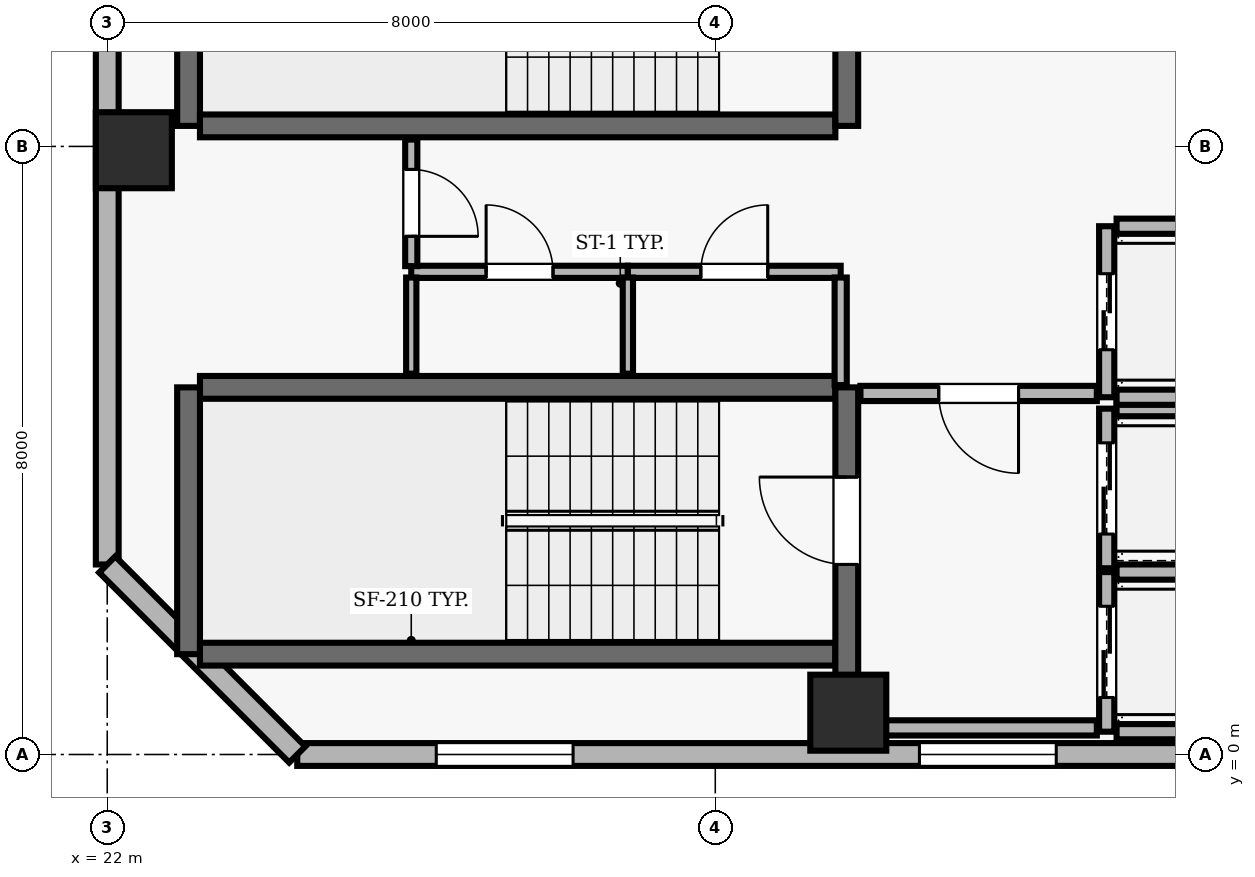
"""IFC4 building model, lengths in metres.
Left out: names, types, materials, properties, quantities, classifications, styles, units other than length and angle.
Written with IfcOpenShell. Run it as: python <this file> out.ifc"""

import sys

from ifc_helpers import new_model, si_unit, direction, frame, frame_2d, origin, origin_2d, place, context, subcontext, project, spatial, rectangle, extrude, element, fill, save


model = new_model("IFC4")
c1 = context("Model", 3, precision=1e-05, world=origin(), true_north=direction((0.0, 1.0)))
c2 = subcontext(c1, "Body", "Model", "MODEL_VIEW")
j1 = project(units=[si_unit("LENGTHUNIT", "METRE"), si_unit("PLANEANGLEUNIT", "RADIAN")], contexts=[c1])
p1 = place(None, origin())
s1 = spatial("IfcSite", under=j1, at=p1, CompositionType="ELEMENT")
p2 = place(p1, origin())
s2 = spatial("IfcBuilding", under=s1, at=p2, CompositionType="ELEMENT")
p3 = place(p2, frame((0.0, 0.0, 234.3)))
s3 = spatial("IfcBuildingStorey", under=s2, at=p3, CompositionType="ELEMENT", Elevation=234.3)
for number, where, z_axis, x_axis in (
    (1, (31.75, 0.55, 0.0), (0.0, 0.0, 1.0), (1.0, 0.0, 0.0)),
    (2, (22.35, 7.95, 0.0), (0.0, 0.0, 1.0), (1.0, 0.0, 0.0)),
):
    element("IfcColumn", number, at=place(p3, frame(where, z_axis=z_axis, x_axis=x_axis)), inside=s3, PredefinedType="COLUMN", context=c2, shape_type="SweptSolid", body=[
        extrude(rectangle(XDim=1.0, YDim=1.0, at=origin_2d()), origin(), (0.0, 0.0, 1.0), 3.9),
    ])
p4 = place(p3, frame((24.5, 0.0, 0.0), z_axis=(0.0, 0.0, 1.0), x_axis=(1.0, 0.0, 0.0)))
e3 = element("IfcWall", 3, at=p4, inside=s3, PredefinedType="SOLIDWALL", context=c2, shape_type="SweptSolid", body=[
    extrude(rectangle(XDim=38.2, YDim=0.3, at=frame_2d((19.1, 0.0))), origin(), (0.0, 0.0, 1.0), 3.64),
])
p5 = place(p4, frame((1.829, 0.0, 0.9)))
e4 = element("IfcOpeningElement", 4, at=p5, cuts=e3, PredefinedType="OPENING", context=c2, shape_type="SweptSolid", body=[
    extrude(rectangle(XDim=1.8, YDim=2.2, at=frame_2d((0.9, 1.1))), frame((0.0, 0.16, 0.0), z_axis=(0.0, -1.0, 0.0), x_axis=(1.0, 0.0, 0.0)), (0.0, 0.0, 1.0), 0.32),
])
p6 = place(p4, frame((8.186, 0.0, 0.9)))
e5 = element("IfcOpeningElement", 5, at=p6, cuts=e3, PredefinedType="OPENING", context=c2, shape_type="SweptSolid", body=[
    extrude(rectangle(XDim=1.8, YDim=2.2, at=frame_2d((0.9, 1.1))), frame((0.0, 0.16, 0.0), z_axis=(0.0, -1.0, 0.0), x_axis=(1.0, 0.0, 0.0)), (0.0, 0.0, 1.0), 0.32),
])
p7 = place(p4, frame((18.2, 0.0, 0.9)))
e6 = element("IfcOpeningElement", 6, at=p7, cuts=e3, PredefinedType="OPENING", context=c2, shape_type="SweptSolid", body=[
    extrude(rectangle(XDim=1.8, YDim=2.2, at=frame_2d((0.9, 1.1))), frame((0.0, 0.16, 0.0), z_axis=(0.0, -1.0, 0.0), x_axis=(1.0, 0.0, 0.0)), (0.0, 0.0, 1.0), 0.32),
])
p8 = place(p4, frame((23.657, 0.0, 0.9)))
e7 = element("IfcOpeningElement", 7, at=p8, cuts=e3, PredefinedType="OPENING", context=c2, shape_type="SweptSolid", body=[
    extrude(rectangle(XDim=1.8, YDim=2.2, at=frame_2d((0.9, 1.1))), frame((0.0, 0.16, 0.0), z_axis=(0.0, -1.0, 0.0), x_axis=(1.0, 0.0, 0.0)), (0.0, 0.0, 1.0), 0.32),
])
p9 = place(p4, frame((30.014, 0.0, 0.9)))
e8 = element("IfcOpeningElement", 8, at=p9, cuts=e3, PredefinedType="OPENING", context=c2, shape_type="SweptSolid", body=[
    extrude(rectangle(XDim=1.8, YDim=2.2, at=frame_2d((0.9, 1.1))), frame((0.0, 0.16, 0.0), z_axis=(0.0, -1.0, 0.0), x_axis=(1.0, 0.0, 0.0)), (0.0, 0.0, 1.0), 0.32),
])
p10 = place(p3, frame((22.0, 40.7, 0.0), z_axis=(0.0, 0.0, 1.0), x_axis=(0.0, -1.0, 0.0)))
e9 = element("IfcWall", 9, at=p10, inside=s3, PredefinedType="SOLIDWALL", context=c2, shape_type="SweptSolid", body=[
    extrude(rectangle(XDim=38.2, YDim=0.3, at=frame_2d((19.1, 0.0))), origin(), (0.0, 0.0, 1.0), 3.64),
])
p11 = place(p10, frame((6.7, 0.0, 0.0)))
e10 = element("IfcOpeningElement", 10, at=p11, cuts=e9, PredefinedType="OPENING", context=c2, shape_type="SweptSolid", body=[
    extrude(rectangle(XDim=1.0, YDim=2.2, at=frame_2d((0.5, 1.1))), frame((0.0, 0.16, 0.0), z_axis=(0.0, -1.0, 0.0), x_axis=(1.0, 0.0, 0.0)), (0.0, 0.0, 1.0), 0.32),
])
p12 = place(p10, frame((12.293, 0.0, 0.9)))
e11 = element("IfcOpeningElement", 11, at=p12, cuts=e9, PredefinedType="OPENING", context=c2, shape_type="SweptSolid", body=[
    extrude(rectangle(XDim=1.8, YDim=2.2, at=frame_2d((0.9, 1.1))), frame((0.0, 0.16, 0.0), z_axis=(0.0, -1.0, 0.0), x_axis=(1.0, 0.0, 0.0)), (0.0, 0.0, 1.0), 0.32),
])
p13 = place(p10, frame((18.2, 0.0, 0.9)))
e12 = element("IfcOpeningElement", 12, at=p13, cuts=e9, PredefinedType="OPENING", context=c2, shape_type="SweptSolid", body=[
    extrude(rectangle(XDim=1.8, YDim=2.2, at=frame_2d((0.9, 1.1))), frame((0.0, 0.16, 0.0), z_axis=(0.0, -1.0, 0.0), x_axis=(1.0, 0.0, 0.0)), (0.0, 0.0, 1.0), 0.32),
])
p14 = place(p10, frame((23.207, 0.0, 0.9)))
e13 = element("IfcOpeningElement", 13, at=p14, cuts=e9, PredefinedType="OPENING", context=c2, shape_type="SweptSolid", body=[
    extrude(rectangle(XDim=1.8, YDim=2.2, at=frame_2d((0.9, 1.1))), frame((0.0, 0.16, 0.0), z_axis=(0.0, -1.0, 0.0), x_axis=(1.0, 0.0, 0.0)), (0.0, 0.0, 1.0), 0.32),
])
p15 = place(p10, frame((29.114, 0.0, 0.9)))
e14 = element("IfcOpeningElement", 14, at=p15, cuts=e9, PredefinedType="OPENING", context=c2, shape_type="SweptSolid", body=[
    extrude(rectangle(XDim=1.8, YDim=2.2, at=frame_2d((0.9, 1.1))), frame((0.0, 0.16, 0.0), z_axis=(0.0, -1.0, 0.0), x_axis=(1.0, 0.0, 0.0)), (0.0, 0.0, 1.0), 0.32),
])
p16 = place(p3, frame((22.0, 2.5, 0.0), z_axis=(0.0, 0.0, 1.0), x_axis=(0.707106781187, -0.707106781187, 0.0)))
e15 = element("IfcWall", 15, at=p16, inside=s3, PredefinedType="SOLIDWALL", context=c2, shape_type="SweptSolid", body=[
    extrude(rectangle(XDim=3.536, YDim=0.3, at=frame_2d((1.768, 0.0))), origin(), (0.0, 0.0, 1.0), 3.64),
])
p17 = place(p3, frame((31.58, 4.83, 0.0), z_axis=(0.0, 0.0, 1.0), x_axis=(-1.0, 0.0, 0.0)))
e16 = element("IfcWall", 16, at=p17, inside=s3, PredefinedType="SHEAR", context=c2, shape_type="SweptSolid", body=[
    extrude(rectangle(XDim=8.36, YDim=0.3, at=frame_2d((4.18, 0.0))), origin(), (0.0, 0.0, 1.0), 3.64),
])
p18 = place(p3, frame((23.07, 4.83, 0.0), z_axis=(0.0, 0.0, 1.0), x_axis=(0.0, -1.0, 0.0)))
e17 = element("IfcWall", 17, at=p18, inside=s3, PredefinedType="SHEAR", context=c2, shape_type="SweptSolid", body=[
    extrude(rectangle(XDim=3.51, YDim=0.3, at=frame_2d((1.755, 0.0))), origin(), (0.0, 0.0, 1.0), 3.64),
])
p19 = place(p3, frame((23.22, 1.32, 0.0), z_axis=(0.0, 0.0, 1.0), x_axis=(1.0, 0.0, 0.0)))
e18 = element("IfcWall", 18, at=p19, inside=s3, PredefinedType="SHEAR", context=c2, shape_type="SweptSolid", body=[
    extrude(rectangle(XDim=8.36, YDim=0.3, at=frame_2d((4.18, 0.0))), origin(), (0.0, 0.0, 1.0), 3.64),
])
p20 = place(p3, frame((31.73, 0.96, 0.0), z_axis=(0.0, 0.0, 1.0), x_axis=(0.0, 1.0, 0.0)))
e19 = element("IfcWall", 19, at=p20, inside=s3, PredefinedType="SHEAR", context=c2, shape_type="SweptSolid", body=[
    extrude(rectangle(XDim=3.87, YDim=0.3, at=frame_2d((1.935, 0.0))), origin(), (0.0, 0.0, 1.0), 3.64),
])
p21 = place(p20, frame((1.54, 0.0, 0.0)))
e20 = element("IfcOpeningElement", 20, at=p21, cuts=e19, PredefinedType="OPENING", context=c2, shape_type="SweptSolid", body=[
    extrude(rectangle(XDim=1.15, YDim=2.15, at=frame_2d((0.575, 1.075))), frame((0.0, 0.16, 0.0), z_axis=(0.0, -1.0, 0.0), x_axis=(1.0, 0.0, 0.0)), (0.0, 0.0, 1.0), 0.32),
])
p22 = place(p3, frame((23.07, 11.78, 0.0), z_axis=(0.0, 0.0, 1.0), x_axis=(0.0, -1.0, 0.0)))
e21 = element("IfcWall", 21, at=p22, inside=s3, PredefinedType="SHEAR", context=c2, shape_type="SweptSolid", body=[
    extrude(rectangle(XDim=3.51, YDim=0.3, at=frame_2d((1.755, 0.0))), origin(), (0.0, 0.0, 1.0), 3.64),
])
p23 = place(p3, frame((23.22, 8.27, 0.0), z_axis=(0.0, 0.0, 1.0), x_axis=(1.0, 0.0, 0.0)))
e22 = element("IfcWall", 22, at=p23, inside=s3, PredefinedType="SHEAR", context=c2, shape_type="SweptSolid", body=[
    extrude(rectangle(XDim=8.36, YDim=0.3, at=frame_2d((4.18, 0.0))), origin(), (0.0, 0.0, 1.0), 3.64),
])
p24 = place(p3, frame((31.73, 8.27, 0.0), z_axis=(0.0, 0.0, 1.0), x_axis=(0.0, 1.0, 0.0)))
e23 = element("IfcWall", 23, at=p24, inside=s3, PredefinedType="SHEAR", context=c2, shape_type="SweptSolid", body=[
    extrude(rectangle(XDim=3.51, YDim=0.3, at=frame_2d((1.755, 0.0))), origin(), (0.0, 0.0, 1.0), 3.64),
])
p25 = place(p24, frame((1.18, 0.0, 0.0)))
e24 = element("IfcOpeningElement", 24, at=p25, cuts=e23, PredefinedType="OPENING", context=c2, shape_type="SweptSolid", body=[
    extrude(rectangle(XDim=1.15, YDim=2.15, at=frame_2d((0.575, 1.075))), frame((0.0, 0.16, 0.0), z_axis=(0.0, -1.0, 0.0), x_axis=(1.0, 0.0, 0.0)), (0.0, 0.0, 1.0), 0.32),
])
p26 = place(p3, frame((35.15, 2.4, 0.0), z_axis=(0.0, 0.0, 1.0), x_axis=(0.0, -1.0, 0.0)))
e25 = element("IfcWall", 25, at=p26, inside=s3, PredefinedType="SOLIDWALL", context=c2, shape_type="SweptSolid", body=[
    extrude(rectangle(XDim=2.1, YDim=0.2, at=frame_2d((1.05, 0.0))), origin(), (0.0, 0.0, 1.0), 3.64),
])
p27 = place(p26, frame((0.45, 0.0, 0.0)))
e26 = element("IfcOpeningElement", 26, at=p27, cuts=e25, PredefinedType="OPENING", context=c2, shape_type="SweptSolid", body=[
    extrude(rectangle(XDim=1.2, YDim=2.15, at=frame_2d((0.6, 1.075))), frame((0.0, 0.11, 0.0), z_axis=(0.0, -1.0, 0.0), x_axis=(1.0, 0.0, 0.0)), (0.0, 0.0, 1.0), 0.22),
])
for number, where, z_axis, x_axis in (
    (27, (35.28, 0.3, 0.0), (0.0, 0.0, 1.0), (1.0, 0.0, 0.0)),
    (28, (37.42, 2.4, 0.0), (0.0, 0.0, 1.0), (-1.0, 0.0, 0.0)),
):
    element("IfcWall", number, at=place(p3, frame(where, z_axis=z_axis, x_axis=x_axis)), inside=s3, PredefinedType="SOLIDWALL", context=c2, shape_type="SweptSolid", body=[
        extrude(rectangle(XDim=2.14, YDim=0.2, at=frame_2d((1.07, 0.0))), origin(), (0.0, 0.0, 1.0), 3.64),
    ])
p28 = place(p3, frame((35.15, 4.55, 0.0), z_axis=(0.0, 0.0, 1.0), x_axis=(0.0, -1.0, 0.0)))
e29 = element("IfcWall", 29, at=p28, inside=s3, PredefinedType="SOLIDWALL", context=c2, shape_type="SweptSolid", body=[
    extrude(rectangle(XDim=2.1, YDim=0.2, at=frame_2d((1.05, 0.0))), origin(), (0.0, 0.0, 1.0), 3.64),
])
p29 = place(p28, frame((0.45, 0.0, 0.0)))
e30 = element("IfcOpeningElement", 30, at=p29, cuts=e29, PredefinedType="OPENING", context=c2, shape_type="SweptSolid", body=[
    extrude(rectangle(XDim=1.2, YDim=2.15, at=frame_2d((0.6, 1.075))), frame((0.0, 0.11, 0.0), z_axis=(0.0, -1.0, 0.0), x_axis=(1.0, 0.0, 0.0)), (0.0, 0.0, 1.0), 0.22),
])
p30 = place(p3, frame((37.42, 4.55, 0.0), z_axis=(0.0, 0.0, 1.0), x_axis=(-1.0, 0.0, 0.0)))
e31 = element("IfcWall", 31, at=p30, inside=s3, PredefinedType="SOLIDWALL", context=c2, shape_type="SweptSolid", body=[
    extrude(rectangle(XDim=2.14, YDim=0.2, at=frame_2d((1.07, 0.0))), origin(), (0.0, 0.0, 1.0), 3.64),
])
p31 = place(p3, frame((35.15, 6.95, 0.0), z_axis=(0.0, 0.0, 1.0), x_axis=(0.0, -1.0, 0.0)))
e32 = element("IfcWall", 32, at=p31, inside=s3, PredefinedType="SOLIDWALL", context=c2, shape_type="SweptSolid", body=[
    extrude(rectangle(XDim=2.25, YDim=0.2, at=frame_2d((1.125, 0.0))), origin(), (0.0, 0.0, 1.0), 3.64),
])
p32 = place(p31, frame((0.625, 0.0, 0.0)))
e33 = element("IfcOpeningElement", 33, at=p32, cuts=e32, PredefinedType="OPENING", context=c2, shape_type="SweptSolid", body=[
    extrude(rectangle(XDim=1.0, YDim=2.1, at=frame_2d((0.5, 1.05))), frame((0.0, 0.11, 0.0), z_axis=(0.0, -1.0, 0.0), x_axis=(1.0, 0.0, 0.0)), (0.0, 0.0, 1.0), 0.22),
])
for number, where, z_axis, x_axis in (
    (34, (35.28, 4.7, 0.0), (0.0, 0.0, 1.0), (1.0, 0.0, 0.0)),
    (35, (37.42, 6.95, 0.0), (0.0, 0.0, 1.0), (-1.0, 0.0, 0.0)),
):
    element("IfcWall", number, at=place(p3, frame(where, z_axis=z_axis, x_axis=x_axis)), inside=s3, PredefinedType="SOLIDWALL", context=c2, shape_type="SweptSolid", body=[
        extrude(rectangle(XDim=2.14, YDim=0.2, at=frame_2d((1.07, 0.0))), origin(), (0.0, 0.0, 1.0), 3.64),
    ])
p33 = place(p3, frame((26.0, 6.35, 0.0), z_axis=(0.0, 0.0, 1.0), x_axis=(1.0, 0.0, 0.0)))
e36 = element("IfcWall", 36, at=p33, inside=s3, PredefinedType="PARTITIONING", context=c2, shape_type="SweptSolid", body=[
    extrude(rectangle(XDim=2.85, YDim=0.16, at=frame_2d((1.425, 0.0))), origin(), (0.0, 0.0, 1.0), 3.64),
])
p34 = place(p33, frame((0.985, 0.0, 0.0)))
e37 = element("IfcOpeningElement", 37, at=p34, cuts=e36, PredefinedType="OPENING", context=c2, shape_type="SweptSolid", body=[
    extrude(rectangle(XDim=0.88, YDim=2.1, at=frame_2d((0.44, 1.05))), frame((0.0, 0.09, 0.0), z_axis=(0.0, -1.0, 0.0), x_axis=(1.0, 0.0, 0.0)), (0.0, 0.0, 1.0), 0.18),
])
p35 = place(p3, frame((28.85, 6.35, 0.0), z_axis=(0.0, 0.0, 1.0), x_axis=(1.0, 0.0, 0.0)))
e38 = element("IfcWall", 38, at=p35, inside=s3, PredefinedType="PARTITIONING", context=c2, shape_type="SweptSolid", body=[
    extrude(rectangle(XDim=2.8, YDim=0.16, at=frame_2d((1.4, 0.0))), origin(), (0.0, 0.0, 1.0), 3.64),
])
p36 = place(p35, frame((0.96, 0.0, 0.0)))
e39 = element("IfcOpeningElement", 39, at=p36, cuts=e38, PredefinedType="OPENING", context=c2, shape_type="SweptSolid", body=[
    extrude(rectangle(XDim=0.88, YDim=2.1, at=frame_2d((0.44, 1.05))), frame((0.0, 0.09, 0.0), z_axis=(0.0, -1.0, 0.0), x_axis=(1.0, 0.0, 0.0)), (0.0, 0.0, 1.0), 0.18),
])
p37 = place(p3, frame((31.65, 0.35, 0.0), z_axis=(0.0, 0.0, 1.0), x_axis=(1.0, 0.0, 0.0)))
e40 = element("IfcWall", 40, at=p37, inside=s3, PredefinedType="SOLIDWALL", context=c2, shape_type="SweptSolid", body=[
    extrude(rectangle(XDim=3.37, YDim=0.2, at=frame_2d((1.685, 0.0))), origin(), (0.0, 0.0, 1.0), 3.64),
])
p38 = place(p3, frame((35.02, 4.75, 0.0), z_axis=(0.0, 0.0, 1.0), x_axis=(-1.0, 0.0, 0.0)))
e41 = element("IfcWall", 41, at=p38, inside=s3, PredefinedType="SOLIDWALL", context=c2, shape_type="SweptSolid", body=[
    extrude(rectangle(XDim=3.11, YDim=0.2, at=frame_2d((1.555, 0.0))), origin(), (0.0, 0.0, 1.0), 3.64),
])
p39 = place(p38, frame((1.03, 0.0, 0.0)))
e42 = element("IfcOpeningElement", 42, at=p39, cuts=e41, PredefinedType="OPENING", context=c2, shape_type="SweptSolid", body=[
    extrude(rectangle(XDim=1.05, YDim=2.15, at=frame_2d((0.525, 1.075))), frame((0.0, 0.11, 0.0), z_axis=(0.0, -1.0, 0.0), x_axis=(1.0, 0.0, 0.0)), (0.0, 0.0, 1.0), 0.22),
])
p40 = place(p3, frame((26.0, 5.01, 0.0), z_axis=(0.0, 0.0, 1.0), x_axis=(0.0, 1.0, 0.0)))
e43 = element("IfcWall", 43, at=p40, inside=s3, PredefinedType="PARTITIONING", context=c2, shape_type="SweptSolid", body=[
    extrude(rectangle(XDim=1.265, YDim=0.135, at=frame_2d((0.632, 0.0))), origin(), (0.0, 0.0, 1.0), 3.64),
])
p41 = place(p3, frame((26.0, 8.09, 0.0), z_axis=(0.0, 0.0, 1.0), x_axis=(0.0, -1.0, 0.0)))
e44 = element("IfcWall", 44, at=p41, inside=s3, PredefinedType="PARTITIONING", context=c2, shape_type="SweptSolid", body=[
    extrude(rectangle(XDim=1.665, YDim=0.16, at=frame_2d((0.833, 0.0))), origin(), (0.0, 0.0, 1.0), 3.64),
])
p42 = place(p41, frame((0.393, 0.0, 0.0)))
e45 = element("IfcOpeningElement", 45, at=p42, cuts=e44, PredefinedType="OPENING", context=c2, shape_type="SweptSolid", body=[
    extrude(rectangle(XDim=0.88, YDim=2.1, at=frame_2d((0.44, 1.05))), frame((0.0, 0.09, 0.0), z_axis=(0.0, -1.0, 0.0), x_axis=(1.0, 0.0, 0.0)), (0.0, 0.0, 1.0), 0.18),
])
p43 = place(p3, frame((28.85, 5.01, 0.0), z_axis=(0.0, 0.0, 1.0), x_axis=(0.0, 1.0, 0.0)))
e46 = element("IfcWall", 46, at=p43, inside=s3, PredefinedType="PARTITIONING", context=c2, shape_type="SweptSolid", body=[
    extrude(rectangle(XDim=1.265, YDim=0.135, at=frame_2d((0.632, 0.0))), origin(), (0.0, 0.0, 1.0), 3.64),
])
p44 = place(p3, frame((31.65, 4.86, 0.0), z_axis=(0.0, 0.0, 1.0), x_axis=(0.0, 1.0, 0.0)))
e47 = element("IfcWall", 47, at=p44, inside=s3, PredefinedType="PARTITIONING", context=c2, shape_type="SweptSolid", body=[
    extrude(rectangle(XDim=1.415, YDim=0.16, at=frame_2d((0.708, 0.0))), origin(), (0.0, 0.0, 1.0), 3.64),
])
p45 = place(p5, origin())
e48 = element("IfcWindow", 48, at=p45, inside=s3, PartitioningType="SINGLE_PANEL", PredefinedType="WINDOW", context=c2, shape_type="SweptSolid", body=[
    extrude(rectangle(XDim=1.8, YDim=2.2, at=frame_2d((0.9, 1.1))), frame((0.0, 0.03, 0.0), z_axis=(0.0, -1.0, 0.0), x_axis=(1.0, 0.0, 0.0)), (0.0, 0.0, 1.0), 0.06),
])
fill(e4, e48)
p46 = place(p6, origin())
e49 = element("IfcWindow", 49, at=p46, inside=s3, PartitioningType="SINGLE_PANEL", PredefinedType="WINDOW", context=c2, shape_type="SweptSolid", body=[
    extrude(rectangle(XDim=1.8, YDim=2.2, at=frame_2d((0.9, 1.1))), frame((0.0, 0.03, 0.0), z_axis=(0.0, -1.0, 0.0), x_axis=(1.0, 0.0, 0.0)), (0.0, 0.0, 1.0), 0.06),
])
fill(e5, e49)
p47 = place(p21, origin())
e50 = element("IfcDoor", 50, at=p47, inside=s3, OperationType="SINGLE_SWING_RIGHT", PredefinedType="DOOR", context=c2, shape_type="SweptSolid", body=[
    extrude(rectangle(XDim=1.15, YDim=2.15, at=frame_2d((0.575, 1.075))), frame((0.0, 0.025, 0.0), z_axis=(0.0, -1.0, 0.0), x_axis=(1.0, 0.0, 0.0)), (0.0, 0.0, 1.0), 0.05),
])
fill(e20, e50)
p48 = place(p27, origin())
e51 = element("IfcDoor", 51, at=p48, inside=s3, OperationType="DOUBLE_DOOR_SLIDING", PredefinedType="DOOR", context=c2, shape_type="SweptSolid", body=[
    extrude(rectangle(XDim=1.2, YDim=2.15, at=frame_2d((0.6, 1.075))), frame((0.0, 0.025, 0.0), z_axis=(0.0, -1.0, 0.0), x_axis=(1.0, 0.0, 0.0)), (0.0, 0.0, 1.0), 0.05),
])
fill(e26, e51)
p49 = place(p29, origin())
e52 = element("IfcDoor", 52, at=p49, inside=s3, OperationType="DOUBLE_DOOR_SLIDING", PredefinedType="DOOR", context=c2, shape_type="SweptSolid", body=[
    extrude(rectangle(XDim=1.2, YDim=2.15, at=frame_2d((0.6, 1.075))), frame((0.0, 0.025, 0.0), z_axis=(0.0, -1.0, 0.0), x_axis=(1.0, 0.0, 0.0)), (0.0, 0.0, 1.0), 0.05),
])
fill(e30, e52)
p50 = place(p32, origin())
e53 = element("IfcDoor", 53, at=p50, inside=s3, OperationType="DOUBLE_DOOR_SLIDING", PredefinedType="DOOR", context=c2, shape_type="SweptSolid", body=[
    extrude(rectangle(XDim=1.0, YDim=2.1, at=frame_2d((0.5, 1.05))), frame((0.0, 0.025, 0.0), z_axis=(0.0, -1.0, 0.0), x_axis=(1.0, 0.0, 0.0)), (0.0, 0.0, 1.0), 0.05),
])
fill(e33, e53)
p51 = place(p39, origin())
e54 = element("IfcDoor", 54, at=p51, inside=s3, OperationType="SINGLE_SWING_LEFT", PredefinedType="DOOR", context=c2, shape_type="SweptSolid", body=[
    extrude(rectangle(XDim=1.05, YDim=2.15, at=frame_2d((0.525, 1.075))), frame((0.0, 0.025, 0.0), z_axis=(0.0, -1.0, 0.0), x_axis=(1.0, 0.0, 0.0)), (0.0, 0.0, 1.0), 0.05),
])
fill(e42, e54)
p52 = place(p42, origin())
e55 = element("IfcDoor", 55, at=p52, inside=s3, OperationType="SINGLE_SWING_RIGHT", PredefinedType="DOOR", context=c2, shape_type="SweptSolid", body=[
    extrude(rectangle(XDim=0.88, YDim=2.1, at=frame_2d((0.44, 1.05))), frame((0.0, 0.025, 0.0), z_axis=(0.0, -1.0, 0.0), x_axis=(1.0, 0.0, 0.0)), (0.0, 0.0, 1.0), 0.05),
])
fill(e45, e55)
p53 = place(p34, origin())
e56 = element("IfcDoor", 56, at=p53, inside=s3, OperationType="SINGLE_SWING_LEFT", PredefinedType="DOOR", context=c2, shape_type="SweptSolid", body=[
    extrude(rectangle(XDim=0.88, YDim=2.1, at=frame_2d((0.44, 1.05))), frame((0.0, 0.025, 0.0), z_axis=(0.0, -1.0, 0.0), x_axis=(1.0, 0.0, 0.0)), (0.0, 0.0, 1.0), 0.05),
])
fill(e37, e56)
p54 = place(p36, origin())
e57 = element("IfcDoor", 57, at=p54, inside=s3, OperationType="SINGLE_SWING_RIGHT", PredefinedType="DOOR", context=c2, shape_type="SweptSolid", body=[
    extrude(rectangle(XDim=0.88, YDim=2.1, at=frame_2d((0.44, 1.05))), frame((0.0, 0.025, 0.0), z_axis=(0.0, -1.0, 0.0), x_axis=(1.0, 0.0, 0.0)), (0.0, 0.0, 1.0), 0.05),
])
fill(e39, e57)
save(model, sys.argv[1])
